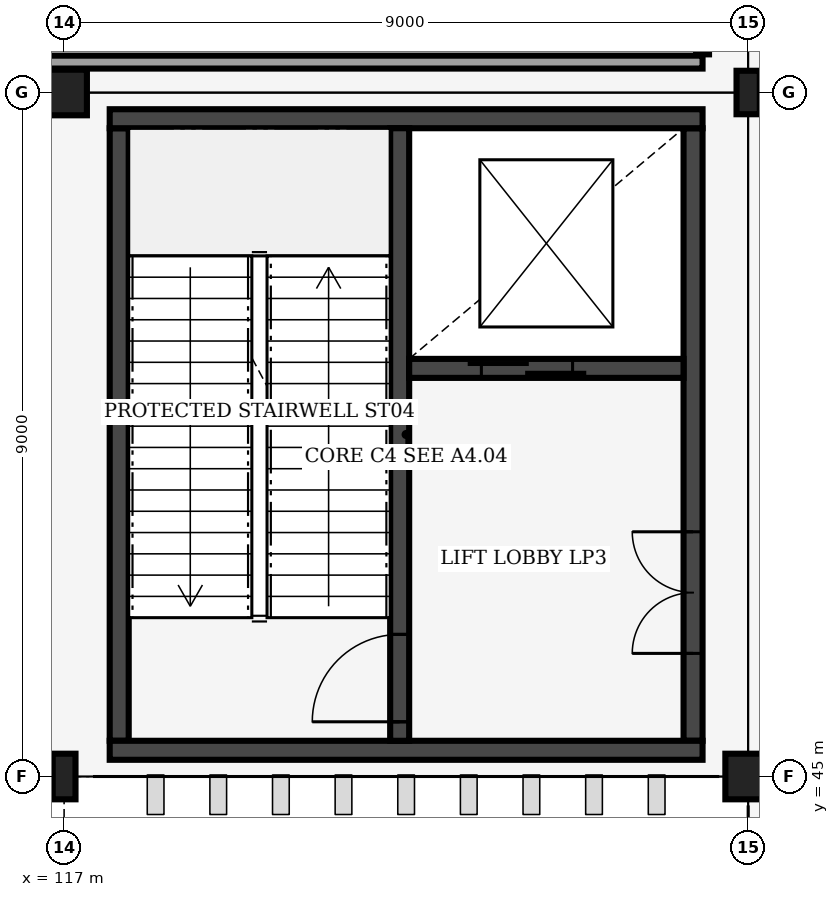
"""IFC4 building model, lengths in metres.
Left out: names, types, materials, properties, quantities, classifications, styles, units other than length and angle.
Written with IfcOpenShell. Run it as: python <this file> out.ifc"""

import sys

from ifc_helpers import new_model, si_unit, direction, frame, frame_2d, origin, origin_2d, place, context, subcontext, project, spatial, rectangle, i_section, extrude, element, fill, save


model = new_model("IFC4")
c1 = context("Model", 3, precision=1e-05, world=origin(), true_north=direction((0.0, 1.0)))
c2 = subcontext(c1, "Body", "Model", "MODEL_VIEW")
j1 = project(units=[si_unit("LENGTHUNIT", "METRE"), si_unit("PLANEANGLEUNIT", "RADIAN")], contexts=[c1])
p1 = place(None, origin())
s1 = spatial("IfcSite", under=j1, at=p1, CompositionType="ELEMENT")
p2 = place(p1, origin())
s2 = spatial("IfcBuilding", under=s1, at=p2, CompositionType="ELEMENT")
p3 = place(p2, frame((0.0, 0.0, 12.0)))
s3 = spatial("IfcBuildingStorey", under=s2, at=p3, CompositionType="ELEMENT", Elevation=12.0)
p4 = place(p3, frame((117.0, 45.0, 0.0), z_axis=(0.0, 0.0, 1.0), x_axis=(1.0, 0.0, 0.0)))
e1 = element("IfcColumn", 1, at=p4, inside=s3, PredefinedType="COLUMN", context=c2, shape_type="SweptSolid", body=[
    extrude(i_section(OverallWidth=0.3, OverallDepth=0.6, WebThickness=0.015, FlangeThickness=0.03, FilletRadius=0.027, at=origin_2d()), origin(), (0.0, 0.0, 1.0), 6.0),
])
for number, where, z_axis, x_axis in (
    (2, (117.0, 54.0, 0.0), (0.0, 0.0, 1.0), (1.0, 0.0, 0.0)),
    (3, (126.0, 45.0, 0.0), (0.0, 0.0, 1.0), (1.0, 0.0, 0.0)),
):
    element("IfcColumn", number, at=place(p3, frame(where, z_axis=z_axis, x_axis=x_axis)), inside=s3, PredefinedType="COLUMN", context=c2, shape_type="SweptSolid", body=[
        extrude(rectangle(XDim=0.6, YDim=0.6, at=origin_2d()), origin(), (0.0, 0.0, 1.0), 6.0),
    ])
p5 = place(p3, frame((126.0, 54.0, 0.0), z_axis=(0.0, 0.0, 1.0), x_axis=(1.0, 0.0, 0.0)))
e4 = element("IfcColumn", 4, at=p5, inside=s3, PredefinedType="COLUMN", context=c2, shape_type="SweptSolid", body=[
    extrude(i_section(OverallWidth=0.306, OverallDepth=0.572, WebThickness=0.021, FlangeThickness=0.04, FilletRadius=0.027, at=origin_2d()), origin(), (0.0, 0.0, 1.0), 6.0),
])
p6 = place(p3, frame((117.725, 45.47, 0.0), z_axis=(0.0, 0.0, 1.0), x_axis=(0.0, 1.0, 0.0)))
e5 = element("IfcWall", 5, at=p6, inside=s3, PredefinedType="SHEAR", context=c2, shape_type="SweptSolid", body=[
    extrude(rectangle(XDim=8.06, YDim=0.25, at=frame_2d((4.03, 0.0))), origin(), (0.0, 0.0, 1.0), 5.7),
])
p7 = place(p3, frame((125.275, 45.47, 0.0), z_axis=(0.0, 0.0, 1.0), x_axis=(0.0, 1.0, 0.0)))
e6 = element("IfcWall", 6, at=p7, inside=s3, PredefinedType="SHEAR", context=c2, shape_type="SweptSolid", body=[
    extrude(rectangle(XDim=8.06, YDim=0.25, at=frame_2d((4.03, 0.0))), origin(), (0.0, 0.0, 1.0), 5.7),
])
p8 = place(p7, frame((1.15, 0.0, 0.0)))
e7 = element("IfcOpeningElement", 7, at=p8, cuts=e6, PredefinedType="OPENING", context=c2, shape_type="SweptSolid", body=[
    extrude(rectangle(XDim=1.6, YDim=2.2, at=frame_2d((0.8, 1.1))), frame((0.0, 0.135, 0.0), z_axis=(0.0, -1.0, 0.0), x_axis=(1.0, 0.0, 0.0)), (0.0, 0.0, 1.0), 0.27),
])
for number, where, z_axis, x_axis in (
    (8, (117.6, 45.345, 0.0), (0.0, 0.0, 1.0), (1.0, 0.0, 0.0)),
    (9, (117.6, 53.655, 0.0), (0.0, 0.0, 1.0), (1.0, 0.0, 0.0)),
):
    element("IfcWall", number, at=place(p3, frame(where, z_axis=z_axis, x_axis=x_axis)), inside=s3, PredefinedType="SHEAR", context=c2, shape_type="SweptSolid", body=[
        extrude(rectangle(XDim=7.8, YDim=0.25, at=frame_2d((3.9, 0.0))), origin(), (0.0, 0.0, 1.0), 5.7),
    ])
p9 = place(p3, frame((121.415, 45.47, 0.0), z_axis=(0.0, 0.0, 1.0), x_axis=(0.0, 1.0, 0.0)))
e10 = element("IfcWall", 10, at=p9, inside=s3, PredefinedType="SHEAR", context=c2, shape_type="SweptSolid", body=[
    extrude(rectangle(XDim=8.06, YDim=0.25, at=frame_2d((4.03, 0.0))), origin(), (0.0, 0.0, 1.0), 5.7),
])
p10 = place(p9, frame((0.25, 0.0, 0.0)))
e11 = element("IfcOpeningElement", 11, at=p10, cuts=e10, PredefinedType="OPENING", context=c2, shape_type="SweptSolid", body=[
    extrude(rectangle(XDim=1.15, YDim=2.15, at=frame_2d((0.575, 1.075))), frame((0.0, 0.135, 0.0), z_axis=(0.0, -1.0, 0.0), x_axis=(1.0, 0.0, 0.0)), (0.0, 0.0, 1.0), 0.27),
])
p11 = place(p3, frame((121.54, 50.37, 0.0), z_axis=(0.0, 0.0, 1.0), x_axis=(1.0, 0.0, 0.0)))
e12 = element("IfcWall", 12, at=p11, inside=s3, PredefinedType="SHEAR", context=c2, shape_type="SweptSolid", body=[
    extrude(rectangle(XDim=3.61, YDim=0.25, at=frame_2d((1.805, 0.0))), origin(), (0.0, 0.0, 1.0), 5.7),
])
p12 = place(p11, frame((0.95, 0.0, 0.0)))
e13 = element("IfcOpeningElement", 13, at=p12, cuts=e12, PredefinedType="OPENING", context=c2, shape_type="SweptSolid", body=[
    extrude(rectangle(XDim=1.2, YDim=2.2, at=frame_2d((0.6, 1.1))), frame((0.0, 0.135, 0.0), z_axis=(0.0, -1.0, 0.0), x_axis=(1.0, 0.0, 0.0)), (0.0, 0.0, 1.0), 0.27),
])
p13 = place(p3, frame((0.6, 54.4, 0.0), z_axis=(0.0, 0.0, 1.0), x_axis=(1.0, 0.0, 0.0)))
e14 = element("IfcWall", 14, at=p13, inside=s3, PredefinedType="PARTITIONING", context=c2, shape_type="SweptSolid", body=[
    extrude(rectangle(XDim=124.8, YDim=0.17, at=frame_2d((62.4, 0.0))), origin(), (0.0, 0.0, 1.0), 4.75),
])
p14 = place(p13, frame((0.85, 0.0, 0.0)))
e15 = element("IfcOpeningElement", 15, at=p14, cuts=e14, PredefinedType="OPENING", context=c2, shape_type="SweptSolid", body=[
    extrude(rectangle(XDim=1.02, YDim=2.15, at=frame_2d((0.51, 1.075))), frame((0.0, 0.095, 0.0), z_axis=(0.0, -1.0, 0.0), x_axis=(1.0, 0.0, 0.0)), (0.0, 0.0, 1.0), 0.19),
])
p15 = place(p3, frame((125.4, 54.502, 0.0), z_axis=(0.0, 0.0, 1.0), x_axis=(0.0, 1.0, 0.0)))
e16 = element("IfcWall", 16, at=p15, inside=s3, PredefinedType="PARTITIONING", context=c2, shape_type="SweptSolid", body=[
    extrude(rectangle(XDim=7.996, YDim=0.17, at=frame_2d((3.998, 0.0))), origin(), (0.0, 0.0, 1.0), 4.75),
])
p16 = place(p10, origin())
e17 = element("IfcDoor", 17, at=p16, inside=s3, OperationType="SINGLE_SWING_LEFT", PredefinedType="DOOR", context=c2, shape_type="SweptSolid", body=[
    extrude(rectangle(XDim=1.15, YDim=2.15, at=frame_2d((0.575, 1.075))), frame((0.0, 0.025, 0.0), z_axis=(0.0, -1.0, 0.0), x_axis=(1.0, 0.0, 0.0)), (0.0, 0.0, 1.0), 0.05),
])
fill(e11, e17)
p17 = place(p12, origin())
e18 = element("IfcDoor", 18, at=p17, inside=s3, OperationType="DOUBLE_DOOR_SLIDING", PredefinedType="DOOR", context=c2, shape_type="SweptSolid", body=[
    extrude(rectangle(XDim=1.2, YDim=2.2, at=frame_2d((0.6, 1.1))), frame((0.0, 0.025, 0.0), z_axis=(0.0, -1.0, 0.0), x_axis=(1.0, 0.0, 0.0)), (0.0, 0.0, 1.0), 0.05),
])
fill(e13, e18)
p18 = place(p8, origin())
e19 = element("IfcDoor", 19, at=p18, inside=s3, OperationType="DOUBLE_DOOR_SINGLE_SWING", PredefinedType="DOOR", context=c2, shape_type="SweptSolid", body=[
    extrude(rectangle(XDim=1.6, YDim=2.2, at=frame_2d((0.8, 1.1))), frame((0.0, 0.025, 0.0), z_axis=(0.0, -1.0, 0.0), x_axis=(1.0, 0.0, 0.0)), (0.0, 0.0, 1.0), 0.05),
])
fill(e7, e19)
save(model, sys.argv[1])
